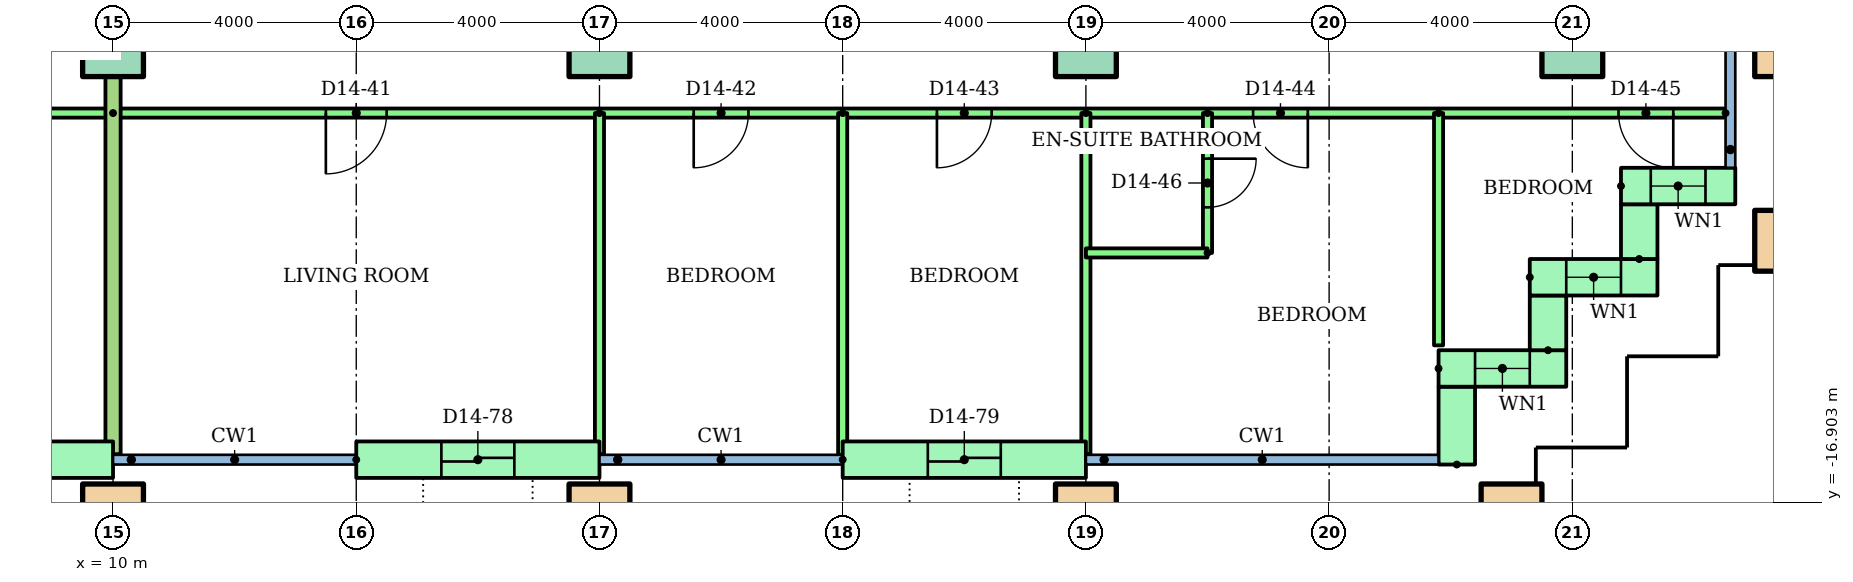
"""IFC4 building model, lengths in metres.
Left out: names, types, materials, properties, quantities, classifications, styles, units other than length and angle.
Written with IfcOpenShell. Run it as: python <this file> out.ifc"""

import sys

from ifc_helpers import new_model, si_unit, direction, frame, frame_2d, origin, origin_2d, place, context, subcontext, project, spatial, rectangle, hollow_rectangle, extrude, element, fill, save


model = new_model("IFC4")
c1 = context("Model", 3, precision=1e-05, world=origin(), true_north=direction((0.0, 1.0)))
c2 = subcontext(c1, "Body", "Model", "MODEL_VIEW")
j1 = project(units=[si_unit("LENGTHUNIT", "METRE"), si_unit("PLANEANGLEUNIT", "RADIAN")], contexts=[c1])
p1 = place(None, origin())
s1 = spatial("IfcSite", under=j1, at=p1, CompositionType="ELEMENT")
p2 = place(p1, origin())
s2 = spatial("IfcBuilding", under=s1, at=p2, CompositionType="ELEMENT")
p3 = place(p2, frame((0.0, 0.0, 54.4)))
s3 = spatial("IfcBuildingStorey", under=s2, at=p3, CompositionType="ELEMENT", Elevation=54.4)
for number, where in (
    (1, (10.0, -17.1, 0.0)),
    (2, (18.0, -17.1, 0.0)),
    (3, (26.0, -17.1, 0.0)),
    (4, (33.0, -17.1, 0.0)),
    (5, (37.5, -12.6, 0.0)),
):
    element("IfcColumn", number, at=place(p3, frame(where)), inside=s3, PredefinedType="COLUMN", context=c2, shape_type="SweptSolid", body=[
        extrude(hollow_rectangle(XDim=1.0, YDim=1.0, WallThickness=0.05, at=origin_2d()), origin(), (0.0, 0.0, 1.0), 3.2),
    ])
for number, where in (
    (6, (10.0, -9.4, 0.0)),
    (7, (18.0, -9.4, 0.0)),
    (8, (26.0, -9.4, 0.0)),
    (9, (34.0, -9.4, 0.0)),
):
    element("IfcColumn", number, at=place(p3, frame(where)), inside=s3, PredefinedType="COLUMN", context=c2, shape_type="SweptSolid", body=[
        extrude(rectangle(XDim=1.0, YDim=1.0, at=origin_2d()), origin(), (0.0, 0.0, 1.0), 3.2),
    ])
p4 = place(p3, frame((37.5, -9.4, 0.0)))
e10 = element("IfcColumn", 10, at=p4, inside=s3, PredefinedType="COLUMN", context=c2, shape_type="SweptSolid", body=[
    extrude(hollow_rectangle(XDim=1.0, YDim=1.0, WallThickness=0.05, at=origin_2d()), origin(), (0.0, 0.0, 1.0), 3.2),
])
p5 = place(p3, frame((6.0, -16.2, 0.0)))
e11 = element("IfcWall", 11, at=p5, inside=s3, PredefinedType="STANDARD", context=c2, shape_type="SweptSolid", body=[
    extrude(rectangle(XDim=4.0, YDim=0.6, at=frame_2d((2.0, 0.0))), origin(), (0.0, 0.0, 1.0), 2.92),
])
p6 = place(p5, frame((1.4, 0.0, 0.0)))
e12 = element("IfcOpeningElement", 12, at=p6, cuts=e11, PredefinedType="OPENING", context=c2, shape_type="SweptSolid", body=[
    extrude(rectangle(XDim=1.2, YDim=2.1, at=frame_2d((0.6, 1.05))), frame((0.0, 0.31, 0.0), z_axis=(0.0, -1.0, 0.0), x_axis=(1.0, 0.0, 0.0)), (0.0, 0.0, 1.0), 0.62),
])
p7 = place(p3, frame((14.0, -16.2, 0.0)))
e13 = element("IfcWall", 13, at=p7, inside=s3, PredefinedType="STANDARD", context=c2, shape_type="SweptSolid", body=[
    extrude(rectangle(XDim=4.0, YDim=0.6, at=frame_2d((2.0, 0.0))), origin(), (0.0, 0.0, 1.0), 2.92),
])
p8 = place(p7, frame((1.4, 0.0, 0.0)))
e14 = element("IfcOpeningElement", 14, at=p8, cuts=e13, PredefinedType="OPENING", context=c2, shape_type="SweptSolid", body=[
    extrude(rectangle(XDim=1.2, YDim=2.1, at=frame_2d((0.6, 1.05))), frame((0.0, 0.31, 0.0), z_axis=(0.0, -1.0, 0.0), x_axis=(1.0, 0.0, 0.0)), (0.0, 0.0, 1.0), 0.62),
])
p9 = place(p3, frame((22.0, -16.2, 0.0)))
e15 = element("IfcWall", 15, at=p9, inside=s3, PredefinedType="STANDARD", context=c2, shape_type="SweptSolid", body=[
    extrude(rectangle(XDim=4.0, YDim=0.6, at=frame_2d((2.0, 0.0))), origin(), (0.0, 0.0, 1.0), 2.92),
])
p10 = place(p9, frame((1.4, 0.0, 0.0)))
e16 = element("IfcOpeningElement", 16, at=p10, cuts=e15, PredefinedType="OPENING", context=c2, shape_type="SweptSolid", body=[
    extrude(rectangle(XDim=1.2, YDim=2.1, at=frame_2d((0.6, 1.05))), frame((0.0, 0.31, 0.0), z_axis=(0.0, -1.0, 0.0), x_axis=(1.0, 0.0, 0.0)), (0.0, 0.0, 1.0), 0.62),
])
p11 = place(p3, frame((32.1, -16.28, 0.0), z_axis=(0.0, 0.0, 1.0), x_axis=(0.0, 1.0, 0.0)))
e17 = element("IfcWall", 17, at=p11, inside=s3, PredefinedType="STANDARD", context=c2, shape_type="SweptSolid", body=[
    extrude(rectangle(XDim=1.28, YDim=0.6, at=frame_2d((0.64, 0.0))), origin(), (0.0, 0.0, 1.0), 2.92),
])
p12 = place(p3, frame((31.8, -14.7, 0.0)))
e18 = element("IfcWall", 18, at=p12, inside=s3, PredefinedType="STANDARD", context=c2, shape_type="SweptSolid", body=[
    extrude(rectangle(XDim=2.1, YDim=0.6, at=frame_2d((1.05, 0.0))), origin(), (0.0, 0.0, 1.0), 2.92),
])
p13 = place(p12, frame((0.6, 0.0, 0.9)))
e19 = element("IfcOpeningElement", 19, at=p13, cuts=e18, PredefinedType="OPENING", context=c2, shape_type="SweptSolid", body=[
    extrude(rectangle(XDim=0.9, YDim=1.5, at=frame_2d((0.45, 0.75))), frame((0.0, 0.31, 0.0), z_axis=(0.0, -1.0, 0.0), x_axis=(1.0, 0.0, 0.0)), (0.0, 0.0, 1.0), 0.62),
])
p14 = place(p3, frame((33.6, -14.4, 0.0), z_axis=(0.0, 0.0, 1.0), x_axis=(0.0, 1.0, 0.0)))
e20 = element("IfcWall", 20, at=p14, inside=s3, PredefinedType="STANDARD", context=c2, shape_type="SweptSolid", body=[
    extrude(rectangle(XDim=0.9, YDim=0.6, at=frame_2d((0.45, 0.0))), origin(), (0.0, 0.0, 1.0), 2.92),
])
p15 = place(p3, frame((33.3, -13.2, 0.0)))
e21 = element("IfcWall", 21, at=p15, inside=s3, PredefinedType="STANDARD", context=c2, shape_type="SweptSolid", body=[
    extrude(rectangle(XDim=2.1, YDim=0.6, at=frame_2d((1.05, 0.0))), origin(), (0.0, 0.0, 1.0), 2.92),
])
p16 = place(p15, frame((0.6, 0.0, 0.9)))
e22 = element("IfcOpeningElement", 22, at=p16, cuts=e21, PredefinedType="OPENING", context=c2, shape_type="SweptSolid", body=[
    extrude(rectangle(XDim=0.9, YDim=1.5, at=frame_2d((0.45, 0.75))), frame((0.0, 0.31, 0.0), z_axis=(0.0, -1.0, 0.0), x_axis=(1.0, 0.0, 0.0)), (0.0, 0.0, 1.0), 0.62),
])
p17 = place(p3, frame((35.1, -12.9, 0.0), z_axis=(0.0, 0.0, 1.0), x_axis=(0.0, 1.0, 0.0)))
e23 = element("IfcWall", 23, at=p17, inside=s3, PredefinedType="STANDARD", context=c2, shape_type="SweptSolid", body=[
    extrude(rectangle(XDim=0.9, YDim=0.6, at=frame_2d((0.45, 0.0))), origin(), (0.0, 0.0, 1.0), 2.92),
])
p18 = place(p3, frame((34.8, -11.7, 0.0)))
e24 = element("IfcWall", 24, at=p18, inside=s3, PredefinedType="STANDARD", context=c2, shape_type="SweptSolid", body=[
    extrude(rectangle(XDim=1.88, YDim=0.6, at=frame_2d((0.94, 0.0))), origin(), (0.0, 0.0, 1.0), 2.92),
])
p19 = place(p18, frame((0.49, 0.0, 0.9)))
e25 = element("IfcOpeningElement", 25, at=p19, cuts=e24, PredefinedType="OPENING", context=c2, shape_type="SweptSolid", body=[
    extrude(rectangle(XDim=0.9, YDim=1.5, at=frame_2d((0.45, 0.75))), frame((0.0, 0.31, 0.0), z_axis=(0.0, -1.0, 0.0), x_axis=(1.0, 0.0, 0.0)), (0.0, 0.0, 1.0), 0.62),
])
p20 = place(p3, frame((10.0, -10.5, 0.0), z_axis=(0.0, 0.0, 1.0), x_axis=(-1.0, 0.0, 0.0)))
e26 = element("IfcWall", 26, at=p20, inside=s3, PredefinedType="PARTITIONING", context=c2, shape_type="SweptSolid", body=[
    extrude(rectangle(XDim=24.0, YDim=0.15, at=frame_2d((12.0, 0.0))), origin(), (0.0, 0.0, 1.0), 2.4),
])
p21 = place(p20, frame((19.5, 0.0, 0.0)))
e27 = element("IfcOpeningElement", 27, at=p21, cuts=e26, PredefinedType="OPENING", context=c2, shape_type="SweptSolid", body=[
    extrude(rectangle(XDim=1.0, YDim=2.1, at=frame_2d((0.5, 1.05))), frame((0.0, 0.085, 0.0), z_axis=(0.0, -1.0, 0.0), x_axis=(1.0, 0.0, 0.0)), (0.0, 0.0, 1.0), 0.17),
])
p22 = place(p20, frame((13.55, 0.0, 0.0)))
e28 = element("IfcOpeningElement", 28, at=p22, cuts=e26, PredefinedType="OPENING", context=c2, shape_type="SweptSolid", body=[
    extrude(rectangle(XDim=0.9, YDim=2.1, at=frame_2d((0.45, 1.05))), frame((0.0, 0.085, 0.0), z_axis=(0.0, -1.0, 0.0), x_axis=(1.0, 0.0, 0.0)), (0.0, 0.0, 1.0), 0.17),
])
p23 = place(p20, frame((9.55, 0.0, 0.0)))
e29 = element("IfcOpeningElement", 29, at=p23, cuts=e26, PredefinedType="OPENING", context=c2, shape_type="SweptSolid", body=[
    extrude(rectangle(XDim=0.9, YDim=2.1, at=frame_2d((0.45, 1.05))), frame((0.0, 0.085, 0.0), z_axis=(0.0, -1.0, 0.0), x_axis=(1.0, 0.0, 0.0)), (0.0, 0.0, 1.0), 0.17),
])
p24 = place(p20, frame((5.55, 0.0, 0.0)))
e30 = element("IfcOpeningElement", 30, at=p24, cuts=e26, PredefinedType="OPENING", context=c2, shape_type="SweptSolid", body=[
    extrude(rectangle(XDim=0.9, YDim=2.1, at=frame_2d((0.45, 1.05))), frame((0.0, 0.085, 0.0), z_axis=(0.0, -1.0, 0.0), x_axis=(1.0, 0.0, 0.0)), (0.0, 0.0, 1.0), 0.17),
])
p25 = place(p20, frame((1.55, 0.0, 0.0)))
e31 = element("IfcOpeningElement", 31, at=p25, cuts=e26, PredefinedType="OPENING", context=c2, shape_type="SweptSolid", body=[
    extrude(rectangle(XDim=0.9, YDim=2.1, at=frame_2d((0.45, 1.05))), frame((0.0, 0.085, 0.0), z_axis=(0.0, -1.0, 0.0), x_axis=(1.0, 0.0, 0.0)), (0.0, 0.0, 1.0), 0.17),
])
p26 = place(p3, frame((36.52, -10.5, 0.0), z_axis=(0.0, 0.0, 1.0), x_axis=(-1.0, 0.0, 0.0)))
e32 = element("IfcWall", 32, at=p26, inside=s3, PredefinedType="PARTITIONING", context=c2, shape_type="SweptSolid", body=[
    extrude(rectangle(XDim=26.52, YDim=0.15, at=frame_2d((13.26, 0.0))), origin(), (0.0, 0.0, 1.0), 2.4),
])
p27 = place(p26, frame((22.02, 0.0, 0.0)))
e33 = element("IfcOpeningElement", 33, at=p27, cuts=e32, PredefinedType="OPENING", context=c2, shape_type="SweptSolid", body=[
    extrude(rectangle(XDim=1.0, YDim=2.1, at=frame_2d((0.5, 1.05))), frame((0.0, 0.085, 0.0), z_axis=(0.0, -1.0, 0.0), x_axis=(1.0, 0.0, 0.0)), (0.0, 0.0, 1.0), 0.17),
])
p28 = place(p26, frame((16.07, 0.0, 0.0)))
e34 = element("IfcOpeningElement", 34, at=p28, cuts=e32, PredefinedType="OPENING", context=c2, shape_type="SweptSolid", body=[
    extrude(rectangle(XDim=0.9, YDim=2.1, at=frame_2d((0.45, 1.05))), frame((0.0, 0.085, 0.0), z_axis=(0.0, -1.0, 0.0), x_axis=(1.0, 0.0, 0.0)), (0.0, 0.0, 1.0), 0.17),
])
p29 = place(p26, frame((12.07, 0.0, 0.0)))
e35 = element("IfcOpeningElement", 35, at=p29, cuts=e32, PredefinedType="OPENING", context=c2, shape_type="SweptSolid", body=[
    extrude(rectangle(XDim=0.9, YDim=2.1, at=frame_2d((0.45, 1.05))), frame((0.0, 0.085, 0.0), z_axis=(0.0, -1.0, 0.0), x_axis=(1.0, 0.0, 0.0)), (0.0, 0.0, 1.0), 0.17),
])
p30 = place(p26, frame((6.87, 0.0, 0.0)))
e36 = element("IfcOpeningElement", 36, at=p30, cuts=e32, PredefinedType="OPENING", context=c2, shape_type="SweptSolid", body=[
    extrude(rectangle(XDim=0.9, YDim=2.1, at=frame_2d((0.45, 1.05))), frame((0.0, 0.085, 0.0), z_axis=(0.0, -1.0, 0.0), x_axis=(1.0, 0.0, 0.0)), (0.0, 0.0, 1.0), 0.17),
])
p31 = place(p26, frame((0.86, 0.0, 0.0)))
e37 = element("IfcOpeningElement", 37, at=p31, cuts=e32, PredefinedType="OPENING", context=c2, shape_type="SweptSolid", body=[
    extrude(rectangle(XDim=0.9, YDim=2.1, at=frame_2d((0.45, 1.05))), frame((0.0, 0.085, 0.0), z_axis=(0.0, -1.0, 0.0), x_axis=(1.0, 0.0, 0.0)), (0.0, 0.0, 1.0), 0.17),
])
p32 = place(p3, frame((18.0, -10.5, 0.0), z_axis=(0.0, 0.0, 1.0), x_axis=(0.0, -1.0, 0.0)))
e38 = element("IfcWall", 38, at=p32, inside=s3, PredefinedType="PARTITIONING", context=c2, shape_type="SweptSolid", body=[
    extrude(rectangle(XDim=5.61, YDim=0.15, at=frame_2d((2.805, 0.0))), origin(), (0.0, 0.0, 1.0), 2.4),
])
p33 = place(p3, frame((22.0, -10.5, 0.0), z_axis=(0.0, 0.0, 1.0), x_axis=(0.0, -1.0, 0.0)))
e39 = element("IfcWall", 39, at=p33, inside=s3, PredefinedType="PARTITIONING", context=c2, shape_type="SweptSolid", body=[
    extrude(rectangle(XDim=5.621, YDim=0.15, at=frame_2d((2.811, 0.0))), origin(), (0.0, 0.0, 1.0), 2.4),
])
p34 = place(p3, frame((26.0, -10.5, 0.0), z_axis=(0.0, 0.0, 1.0), x_axis=(0.0, -1.0, 0.0)))
e40 = element("IfcWall", 40, at=p34, inside=s3, PredefinedType="PARTITIONING", context=c2, shape_type="SweptSolid", body=[
    extrude(rectangle(XDim=5.61, YDim=0.15, at=frame_2d((2.805, 0.0))), origin(), (0.0, 0.0, 1.0), 2.4),
])
p35 = place(p3, frame((31.8, -10.5, 0.0), z_axis=(0.0, 0.0, 1.0), x_axis=(0.0, -1.0, 0.0)))
e41 = element("IfcWall", 41, at=p35, inside=s3, PredefinedType="PARTITIONING", context=c2, shape_type="SweptSolid", body=[
    extrude(rectangle(XDim=3.82, YDim=0.15, at=frame_2d((1.91, 0.0))), origin(), (0.0, 0.0, 1.0), 2.4),
])
p36 = place(p3, frame((28.0, -10.5, 0.0), z_axis=(0.0, 0.0, 1.0), x_axis=(0.0, -1.0, 0.0)))
e42 = element("IfcWall", 42, at=p36, inside=s3, PredefinedType="PARTITIONING", context=c2, shape_type="SweptSolid", body=[
    extrude(rectangle(XDim=2.3, YDim=0.15, at=frame_2d((1.15, 0.0))), origin(), (0.0, 0.0, 1.0), 2.4),
])
p37 = place(p36, frame((0.75, 0.0, 0.0)))
e43 = element("IfcOpeningElement", 43, at=p37, cuts=e42, PredefinedType="OPENING", context=c2, shape_type="SweptSolid", body=[
    extrude(rectangle(XDim=0.8, YDim=2.1, at=frame_2d((0.4, 1.05))), frame((0.0, 0.085, 0.0), z_axis=(0.0, -1.0, 0.0), x_axis=(1.0, 0.0, 0.0)), (0.0, 0.0, 1.0), 0.17),
])
p38 = place(p3, frame((28.0, -12.8, 0.0), z_axis=(0.0, 0.0, 1.0), x_axis=(-1.0, 0.0, 0.0)))
e44 = element("IfcWall", 44, at=p38, inside=s3, PredefinedType="PARTITIONING", context=c2, shape_type="SweptSolid", body=[
    extrude(rectangle(XDim=2.0, YDim=0.15, at=frame_2d((1.0, 0.0))), origin(), (0.0, 0.0, 1.0), 2.4),
])
p39 = place(p3, frame((10.0, -1.4, 0.0), z_axis=(0.0, 0.0, 1.0), x_axis=(0.0, -1.0, 0.0)))
e45 = element("IfcWall", 45, at=p39, inside=s3, PredefinedType="PARTITIONING", context=c2, shape_type="SweptSolid", body=[
    extrude(rectangle(XDim=14.71, YDim=0.25, at=frame_2d((7.355, 0.0))), origin(), (0.0, 0.0, 1.0), 2.4),
])
p40 = place(p13, origin())
e46 = element("IfcWindow", 46, at=p40, inside=s3, PartitioningType="SINGLE_PANEL", PredefinedType="WINDOW", context=c2, shape_type="SweptSolid", body=[
    extrude(rectangle(XDim=0.9, YDim=1.5, at=frame_2d((0.45, 0.75))), frame((0.0, 0.03, 0.0), z_axis=(0.0, -1.0, 0.0), x_axis=(1.0, 0.0, 0.0)), (0.0, 0.0, 1.0), 0.06),
])
fill(e19, e46)
p41 = place(p16, origin())
e47 = element("IfcWindow", 47, at=p41, inside=s3, PartitioningType="SINGLE_PANEL", PredefinedType="WINDOW", context=c2, shape_type="SweptSolid", body=[
    extrude(rectangle(XDim=0.9, YDim=1.5, at=frame_2d((0.45, 0.75))), frame((0.0, 0.03, 0.0), z_axis=(0.0, -1.0, 0.0), x_axis=(1.0, 0.0, 0.0)), (0.0, 0.0, 1.0), 0.06),
])
fill(e22, e47)
p42 = place(p19, origin())
e48 = element("IfcWindow", 48, at=p42, inside=s3, PartitioningType="SINGLE_PANEL", PredefinedType="WINDOW", context=c2, shape_type="SweptSolid", body=[
    extrude(rectangle(XDim=0.9, YDim=1.5, at=frame_2d((0.45, 0.75))), frame((0.0, 0.03, 0.0), z_axis=(0.0, -1.0, 0.0), x_axis=(1.0, 0.0, 0.0)), (0.0, 0.0, 1.0), 0.06),
])
fill(e25, e48)
p43 = place(p27, origin())
e49 = element("IfcDoor", 49, at=p43, inside=s3, OperationType="SINGLE_SWING_RIGHT", PredefinedType="DOOR", context=c2, shape_type="SweptSolid", body=[
    extrude(rectangle(XDim=1.0, YDim=2.1, at=frame_2d((0.5, 1.05))), frame((0.0, 0.025, 0.0), z_axis=(0.0, -1.0, 0.0), x_axis=(1.0, 0.0, 0.0)), (0.0, 0.0, 1.0), 0.05),
])
fill(e33, e49)
p44 = place(p28, origin())
e50 = element("IfcDoor", 50, at=p44, inside=s3, OperationType="SINGLE_SWING_RIGHT", PredefinedType="DOOR", context=c2, shape_type="SweptSolid", body=[
    extrude(rectangle(XDim=0.9, YDim=2.1, at=frame_2d((0.45, 1.05))), frame((0.0, 0.025, 0.0), z_axis=(0.0, -1.0, 0.0), x_axis=(1.0, 0.0, 0.0)), (0.0, 0.0, 1.0), 0.05),
])
fill(e34, e50)
p45 = place(p29, origin())
e51 = element("IfcDoor", 51, at=p45, inside=s3, OperationType="SINGLE_SWING_RIGHT", PredefinedType="DOOR", context=c2, shape_type="SweptSolid", body=[
    extrude(rectangle(XDim=0.9, YDim=2.1, at=frame_2d((0.45, 1.05))), frame((0.0, 0.025, 0.0), z_axis=(0.0, -1.0, 0.0), x_axis=(1.0, 0.0, 0.0)), (0.0, 0.0, 1.0), 0.05),
])
fill(e35, e51)
p46 = place(p30, origin())
e52 = element("IfcDoor", 52, at=p46, inside=s3, OperationType="SINGLE_SWING_LEFT", PredefinedType="DOOR", context=c2, shape_type="SweptSolid", body=[
    extrude(rectangle(XDim=0.9, YDim=2.1, at=frame_2d((0.45, 1.05))), frame((0.0, 0.025, 0.0), z_axis=(0.0, -1.0, 0.0), x_axis=(1.0, 0.0, 0.0)), (0.0, 0.0, 1.0), 0.05),
])
fill(e36, e52)
p47 = place(p31, origin())
e53 = element("IfcDoor", 53, at=p47, inside=s3, OperationType="SINGLE_SWING_LEFT", PredefinedType="DOOR", context=c2, shape_type="SweptSolid", body=[
    extrude(rectangle(XDim=0.9, YDim=2.1, at=frame_2d((0.45, 1.05))), frame((0.0, 0.025, 0.0), z_axis=(0.0, -1.0, 0.0), x_axis=(1.0, 0.0, 0.0)), (0.0, 0.0, 1.0), 0.05),
])
fill(e37, e53)
p48 = place(p37, origin())
e54 = element("IfcDoor", 54, at=p48, inside=s3, OperationType="SINGLE_SWING_LEFT", PredefinedType="DOOR", context=c2, shape_type="SweptSolid", body=[
    extrude(rectangle(XDim=0.8, YDim=2.1, at=frame_2d((0.4, 1.05))), frame((0.0, 0.025, 0.0), z_axis=(0.0, -1.0, 0.0), x_axis=(1.0, 0.0, 0.0)), (0.0, 0.0, 1.0), 0.05),
])
fill(e43, e54)
p49 = place(p8, origin())
e55 = element("IfcDoor", 55, at=p49, inside=s3, OperationType="SLIDING_TO_LEFT", PredefinedType="DOOR", context=c2, shape_type="SweptSolid", body=[
    extrude(rectangle(XDim=1.2, YDim=2.1, at=frame_2d((0.6, 1.05))), frame((0.0, 0.025, 0.0), z_axis=(0.0, -1.0, 0.0), x_axis=(1.0, 0.0, 0.0)), (0.0, 0.0, 1.0), 0.05),
])
fill(e14, e55)
p50 = place(p10, origin())
e56 = element("IfcDoor", 56, at=p50, inside=s3, OperationType="SLIDING_TO_LEFT", PredefinedType="DOOR", context=c2, shape_type="SweptSolid", body=[
    extrude(rectangle(XDim=1.2, YDim=2.1, at=frame_2d((0.6, 1.05))), frame((0.0, 0.025, 0.0), z_axis=(0.0, -1.0, 0.0), x_axis=(1.0, 0.0, 0.0)), (0.0, 0.0, 1.0), 0.05),
])
fill(e16, e56)
save(model, sys.argv[1])
